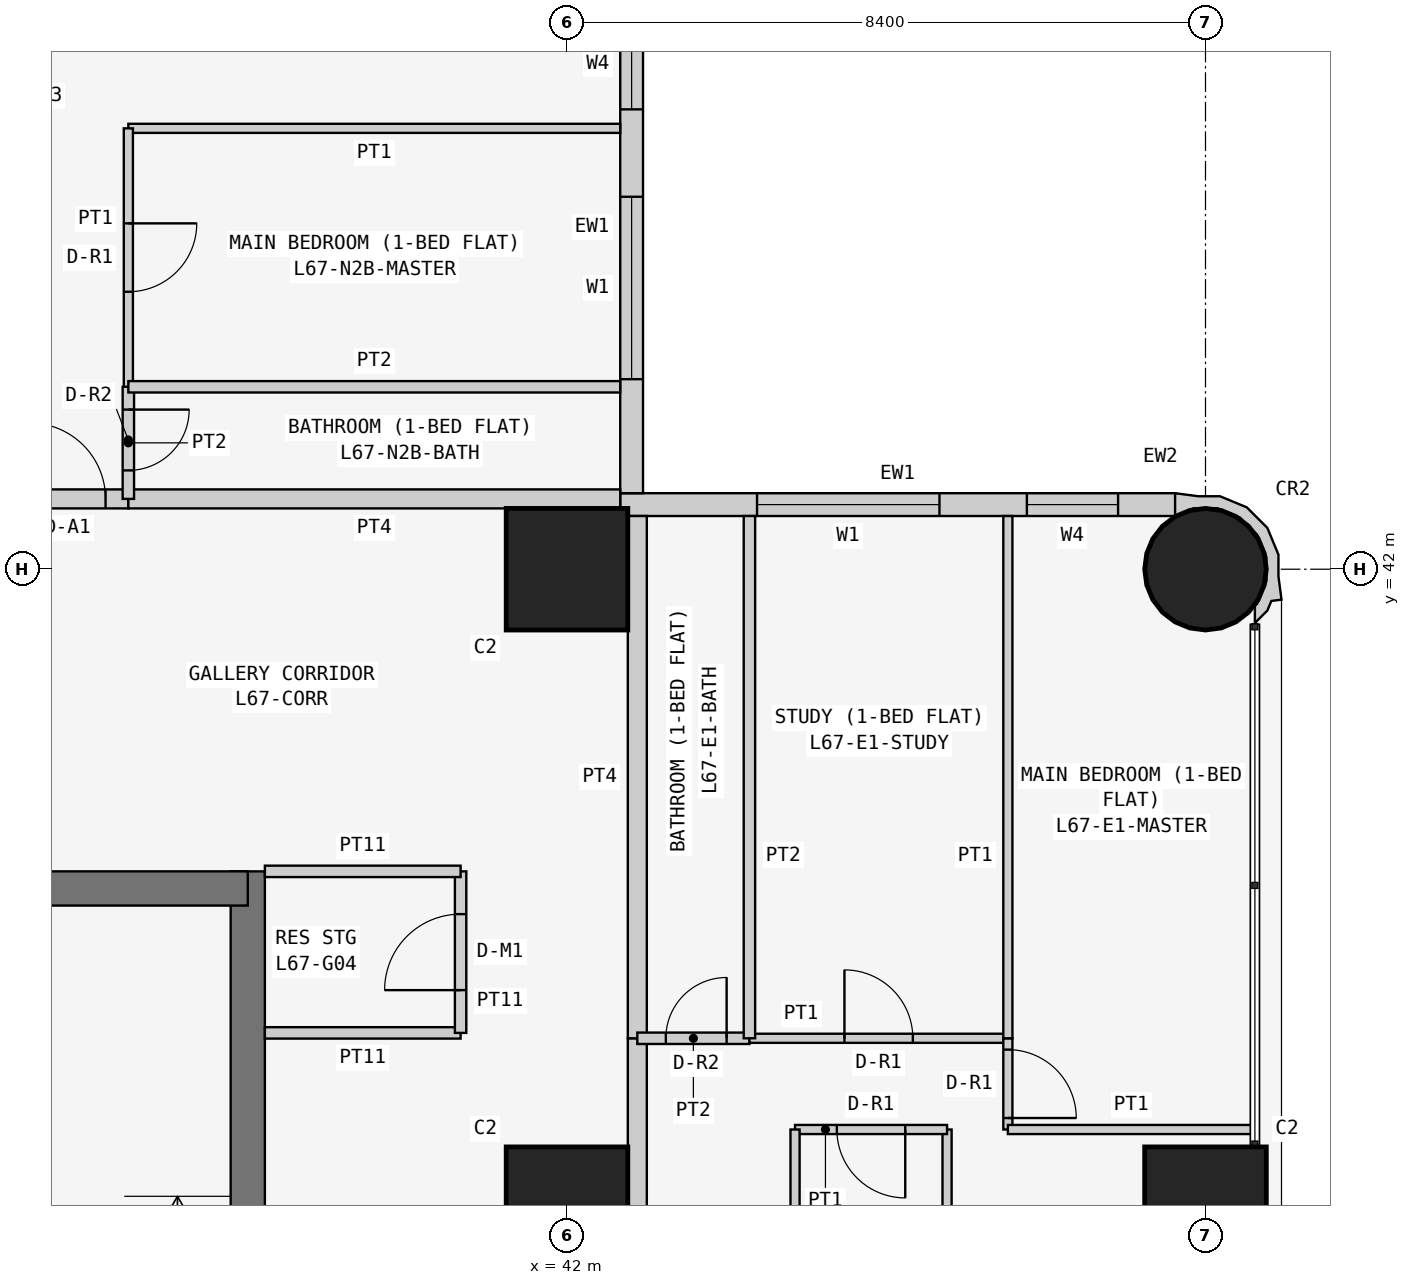
"""IFC4 building model, lengths in metres.
Left out: names, types, materials, properties, quantities, classifications, styles, units other than length and angle.
Written with IfcOpenShell. Run it as: python <this file> out.ifc"""

import sys

from ifc_helpers import new_model, si_unit, direction, frame, frame_2d, origin, origin_2d, place, context, subcontext, project, spatial, polyline, rectangle, circle, outline, extrude, element, fill, save


model = new_model("IFC4")
c1 = context("Model", 3, precision=1e-05, world=origin(), true_north=direction((0.0, 1.0)))
c2 = subcontext(c1, "Body", "Model", "MODEL_VIEW")
j1 = project(units=[si_unit("LENGTHUNIT", "METRE"), si_unit("PLANEANGLEUNIT", "RADIAN")], contexts=[c1])
p1 = place(None, origin())
s1 = spatial("IfcSite", under=j1, at=p1, CompositionType="ELEMENT")
p2 = place(p1, origin())
s2 = spatial("IfcBuilding", under=s1, at=p2, CompositionType="ELEMENT")
p3 = place(p2, frame((0.0, 0.0, 257.7)))
s3 = spatial("IfcBuildingStorey", under=s2, at=p3, CompositionType="ELEMENT", Elevation=257.7)
for number, where, z_axis, x_axis in (
    (1, (42.0, 33.6, 0.0), (0.0, 0.0, 1.0), (1.0, 0.0, 0.0)),
    (2, (42.0, 42.0, 0.0), (0.0, 0.0, 1.0), (1.0, 0.0, 0.0)),
    (3, (50.4, 33.6, 0.0), (0.0, 0.0, 1.0), (1.0, 0.0, 0.0)),
):
    element("IfcColumn", number, at=place(p3, frame(where, z_axis=z_axis, x_axis=x_axis)), inside=s3, PredefinedType="COLUMN", context=c2, shape_type="SweptSolid", body=[
        extrude(rectangle(XDim=1.6, YDim=1.6, at=origin_2d()), origin(), (0.0, 0.0, 1.0), 3.6),
    ])
p4 = place(p3, frame((50.4, 42.0, 0.0), z_axis=(0.0, 0.0, 1.0), x_axis=(1.0, 0.0, 0.0)))
e4 = element("IfcColumn", 4, at=p4, inside=s3, PredefinedType="COLUMN", context=c2, shape_type="SweptSolid", body=[
    extrude(circle(Radius=0.8, at=origin_2d()), origin(), (0.0, 0.0, 1.0), 3.6),
])
p5 = place(p3, frame((37.8, 21.0, 0.0), z_axis=(0.0, 0.0, 1.0), x_axis=(0.0, 1.0, 0.0)))
e5 = element("IfcWall", 5, at=p5, inside=s3, PredefinedType="SHEAR", context=c2, shape_type="SweptSolid", body=[
    extrude(rectangle(XDim=17.025, YDim=0.45, at=frame_2d((8.512, 0.0))), origin(), (0.0, 0.0, 1.0), 3.6),
])
p6 = place(p5, frame((5.2, 0.0, 0.0)))
e6 = element("IfcOpeningElement", 6, at=p6, cuts=e5, PredefinedType="OPENING", context=c2, shape_type="SweptSolid", body=[
    extrude(rectangle(XDim=1.2, YDim=2.1, at=frame_2d((0.6, 1.05))), frame((0.0, 0.235, 0.0), z_axis=(0.0, -1.0, 0.0), x_axis=(1.0, 0.0, 0.0)), (0.0, 0.0, 1.0), 0.47),
])
p7 = place(p3, frame((37.8, 37.8, 0.0), z_axis=(0.0, 0.0, 1.0), x_axis=(-1.0, 0.0, 0.0)))
e7 = element("IfcWall", 7, at=p7, inside=s3, PredefinedType="SHEAR", context=c2, shape_type="SweptSolid", body=[
    extrude(rectangle(XDim=17.025, YDim=0.45, at=frame_2d((8.513, 0.0))), origin(), (0.0, 0.0, 1.0), 3.6),
])
p8 = place(p3, frame((50.0, 42.85, 0.0), z_axis=(0.0, 0.0, 1.0), x_axis=(-1.0, 0.0, 0.0)))
e8 = element("IfcWall", 8, at=p8, inside=s3, PredefinedType="SOLIDWALL", context=c2, shape_type="SweptSolid", body=[
    extrude(rectangle(XDim=7.3, YDim=0.3, at=frame_2d((3.65, 0.0))), origin(), (0.0, 0.0, 1.0), 3.45),
])
p9 = place(p8, frame((3.1, 0.0, 0.9)))
e9 = element("IfcOpeningElement", 9, at=p9, cuts=e8, PredefinedType="OPENING", context=c2, shape_type="SweptSolid", body=[
    extrude(rectangle(XDim=2.4, YDim=1.5, at=frame_2d((1.2, 0.75))), frame((0.0, 0.16, 0.0), z_axis=(0.0, -1.0, 0.0), x_axis=(1.0, 0.0, 0.0)), (0.0, 0.0, 1.0), 0.32),
])
p10 = place(p8, frame((0.75, 0.0, 0.9)))
e10 = element("IfcOpeningElement", 10, at=p10, cuts=e8, PredefinedType="OPENING", context=c2, shape_type="SweptSolid", body=[
    extrude(rectangle(XDim=1.2, YDim=1.5, at=frame_2d((0.6, 0.75))), frame((0.0, 0.16, 0.0), z_axis=(0.0, -1.0, 0.0), x_axis=(1.0, 0.0, 0.0)), (0.0, 0.0, 1.0), 0.32),
])
p11 = place(p3, frame((42.85, 43.0, 0.0), z_axis=(0.0, 0.0, 1.0), x_axis=(0.0, 1.0, 0.0)))
e11 = element("IfcWall", 11, at=p11, inside=s3, PredefinedType="SOLIDWALL", context=c2, shape_type="SweptSolid", body=[
    extrude(rectangle(XDim=7.0, YDim=0.3, at=frame_2d((3.5, 0.0))), origin(), (0.0, 0.0, 1.0), 3.45),
])
p12 = place(p11, frame((1.5, 0.0, 0.9)))
e12 = element("IfcOpeningElement", 12, at=p12, cuts=e11, PredefinedType="OPENING", context=c2, shape_type="SweptSolid", body=[
    extrude(rectangle(XDim=2.4, YDim=1.5, at=frame_2d((1.2, 0.75))), frame((0.0, 0.16, 0.0), z_axis=(0.0, -1.0, 0.0), x_axis=(1.0, 0.0, 0.0)), (0.0, 0.0, 1.0), 0.32),
])
p13 = place(p11, frame((5.05, 0.0, 0.9)))
e13 = element("IfcOpeningElement", 13, at=p13, cuts=e11, PredefinedType="OPENING", context=c2, shape_type="SweptSolid", body=[
    extrude(rectangle(XDim=1.2, YDim=1.5, at=frame_2d((0.6, 0.75))), frame((0.0, 0.16, 0.0), z_axis=(0.0, -1.0, 0.0), x_axis=(1.0, 0.0, 0.0)), (0.0, 0.0, 1.0), 0.32),
])
p14 = place(p3, frame((50.995, 41.352, 0.0), z_axis=(0.0, 0.0, 1.0), x_axis=(0.93923434088, 0.343276641956, 0.0)))
e14 = element("IfcWall", 14, at=p14, inside=s3, PredefinedType="SOLIDWALL", context=c2, shape_type="SweptSolid", body=[
    extrude(outline(polyline([(0.532, 0.393), (0.631, 0.663), (0.614, 1.044), (0.453, 1.391), (0.172, 1.649), (-0.098, 1.748), (-0.369, 1.89), (-0.509, 1.621), (-0.491, 1.615), (-0.479, 1.609), (-0.211, 1.62), (0.088, 1.511), (0.323, 1.295), (0.457, 1.006), (0.47, 0.688), (0.361, 0.389), (0.145, 0.154), (0.108, 0.136), (0.031, -0.075), (0.241, 0.023), (0.333, 0.124), (0.465, 0.094), (0.532, 0.393)])), origin(), (0.0, 0.0, 1.0), 3.45),
])
p15 = place(p3, frame((38.025, 35.9, 0.0), z_axis=(0.0, 0.0, 1.0), x_axis=(1.0, 0.0, 0.0)))
e15 = element("IfcWall", 15, at=p15, inside=s3, PredefinedType="PARTITIONING", context=c2, shape_type="SweptSolid", body=[
    extrude(rectangle(XDim=2.575, YDim=0.15, at=frame_2d((1.288, 0.0))), origin(), (0.0, 0.0, 1.0), 3.45),
])
p16 = place(p3, frame((40.6, 35.9, 0.0), z_axis=(0.0, 0.0, 1.0), x_axis=(0.0, 1.0, 0.0)))
e16 = element("IfcWall", 16, at=p16, inside=s3, PredefinedType="PARTITIONING", context=c2, shape_type="SweptSolid", body=[
    extrude(rectangle(XDim=2.125, YDim=0.15, at=frame_2d((1.062, 0.0))), origin(), (0.0, 0.0, 1.0), 3.45),
])
p17 = place(p16, frame((0.562, 0.0, 0.0)))
e17 = element("IfcOpeningElement", 17, at=p17, cuts=e16, PredefinedType="OPENING", context=c2, shape_type="SweptSolid", body=[
    extrude(rectangle(XDim=1.0, YDim=2.1, at=frame_2d((0.5, 1.05))), frame((0.0, 0.085, 0.0), z_axis=(0.0, -1.0, 0.0), x_axis=(1.0, 0.0, 0.0)), (0.0, 0.0, 1.0), 0.17),
])
p18 = place(p3, frame((40.6, 38.025, 0.0), z_axis=(0.0, 0.0, 1.0), x_axis=(-1.0, 0.0, 0.0)))
e18 = element("IfcWall", 18, at=p18, inside=s3, PredefinedType="PARTITIONING", context=c2, shape_type="SweptSolid", body=[
    extrude(rectangle(XDim=2.575, YDim=0.15, at=frame_2d((1.288, 0.0))), origin(), (0.0, 0.0, 1.0), 3.45),
])
p19 = place(p3, frame((34.629, 42.925, 0.0), z_axis=(0.0, 0.0, 1.0), x_axis=(1.0, 0.0, 0.0)))
e19 = element("IfcWall", 19, at=p19, inside=s3, PredefinedType="PARTITIONING", context=c2, shape_type="SweptSolid", body=[
    extrude(rectangle(XDim=1.6, YDim=0.25, at=frame_2d((0.8, 0.0))), origin(), (0.0, 0.0, 1.0), 3.45),
])
p20 = place(p19, frame((0.3, 0.0, 0.0)))
e20 = element("IfcOpeningElement", 20, at=p20, cuts=e19, PredefinedType="OPENING", context=c2, shape_type="SweptSolid", body=[
    extrude(rectangle(XDim=1.0, YDim=2.1, at=frame_2d((0.5, 1.05))), frame((0.0, 0.135, 0.0), z_axis=(0.0, -1.0, 0.0), x_axis=(1.0, 0.0, 0.0)), (0.0, 0.0, 1.0), 0.27),
])
p21 = place(p3, frame((36.229, 42.925, 0.0), z_axis=(0.0, 0.0, 1.0), x_axis=(1.0, 0.0, 0.0)))
e21 = element("IfcWall", 21, at=p21, inside=s3, PredefinedType="PARTITIONING", context=c2, shape_type="SweptSolid", body=[
    extrude(rectangle(XDim=6.471, YDim=0.25, at=frame_2d((3.235, 0.0))), origin(), (0.0, 0.0, 1.0), 3.45),
])
p22 = place(p3, frame((42.925, 35.829, 0.0), z_axis=(0.0, 0.0, 1.0), x_axis=(0.0, -1.0, 0.0)))
e22 = element("IfcWall", 22, at=p22, inside=s3, PredefinedType="PARTITIONING", context=c2, shape_type="SweptSolid", body=[
    extrude(rectangle(XDim=6.429, YDim=0.25, at=frame_2d((3.215, 0.0))), origin(), (0.0, 0.0, 1.0), 3.45),
])
p23 = place(p22, frame((4.929, 0.0, 0.0)))
e23 = element("IfcOpeningElement", 23, at=p23, cuts=e22, PredefinedType="OPENING", context=c2, shape_type="SweptSolid", body=[
    extrude(rectangle(XDim=1.0, YDim=2.1, at=frame_2d((0.5, 1.05))), frame((0.0, 0.135, 0.0), z_axis=(0.0, -1.0, 0.0), x_axis=(1.0, 0.0, 0.0)), (0.0, 0.0, 1.0), 0.27),
])
p24 = place(p3, frame((42.925, 42.7, 0.0), z_axis=(0.0, 0.0, 1.0), x_axis=(0.0, -1.0, 0.0)))
e24 = element("IfcWall", 24, at=p24, inside=s3, PredefinedType="PARTITIONING", context=c2, shape_type="SweptSolid", body=[
    extrude(rectangle(XDim=6.871, YDim=0.25, at=frame_2d((3.436, 0.0))), origin(), (0.0, 0.0, 1.0), 3.45),
])
p25 = place(p3, frame((36.229, 44.4, 0.0), z_axis=(0.0, 0.0, 1.0), x_axis=(0.0, -1.0, 0.0)))
e25 = element("IfcWall", 25, at=p25, inside=s3, PredefinedType="PARTITIONING", context=c2, shape_type="SweptSolid", body=[
    extrude(rectangle(XDim=1.475, YDim=0.15, at=frame_2d((0.737, 0.0))), origin(), (0.0, 0.0, 1.0), 3.45),
])
p26 = place(p25, frame((0.3, 0.0, 0.0)))
e26 = element("IfcOpeningElement", 26, at=p26, cuts=e25, PredefinedType="OPENING", context=c2, shape_type="SweptSolid", body=[
    extrude(rectangle(XDim=0.8, YDim=2.1, at=frame_2d((0.4, 1.05))), frame((0.0, 0.085, 0.0), z_axis=(0.0, -1.0, 0.0), x_axis=(1.0, 0.0, 0.0)), (0.0, 0.0, 1.0), 0.17),
])
p27 = place(p3, frame((42.7, 47.8, 0.0), z_axis=(0.0, 0.0, 1.0), x_axis=(-1.0, 0.0, 0.0)))
e27 = element("IfcWall", 27, at=p27, inside=s3, PredefinedType="PARTITIONING", context=c2, shape_type="SweptSolid", body=[
    extrude(rectangle(XDim=6.471, YDim=0.12, at=frame_2d((3.235, 0.0))), origin(), (0.0, 0.0, 1.0), 3.45),
])
p28 = place(p3, frame((36.229, 47.8, 0.0), z_axis=(0.0, 0.0, 1.0), x_axis=(0.0, -1.0, 0.0)))
e28 = element("IfcWall", 28, at=p28, inside=s3, PredefinedType="PARTITIONING", context=c2, shape_type="SweptSolid", body=[
    extrude(rectangle(XDim=3.4, YDim=0.12, at=frame_2d((1.7, 0.0))), origin(), (0.0, 0.0, 1.0), 3.45),
])
p29 = place(p28, frame((1.25, 0.0, 0.0)))
e29 = element("IfcOpeningElement", 29, at=p29, cuts=e28, PredefinedType="OPENING", context=c2, shape_type="SweptSolid", body=[
    extrude(rectangle(XDim=0.9, YDim=2.1, at=frame_2d((0.45, 1.05))), frame((0.0, 0.07, 0.0), z_axis=(0.0, -1.0, 0.0), x_axis=(1.0, 0.0, 0.0)), (0.0, 0.0, 1.0), 0.14),
])
p30 = place(p3, frame((36.229, 44.4, 0.0), z_axis=(0.0, 0.0, 1.0), x_axis=(1.0, 0.0, 0.0)))
e30 = element("IfcWall", 30, at=p30, inside=s3, PredefinedType="PARTITIONING", context=c2, shape_type="SweptSolid", body=[
    extrude(rectangle(XDim=6.471, YDim=0.15, at=frame_2d((3.235, 0.0))), origin(), (0.0, 0.0, 1.0), 3.45),
])
p31 = place(p3, frame((47.0, 29.4, 0.0), z_axis=(0.0, 0.0, 1.0), x_axis=(0.0, 1.0, 0.0)))
e31 = element("IfcWall", 31, at=p31, inside=s3, PredefinedType="PARTITIONING", context=c2, shape_type="SweptSolid", body=[
    extrude(rectangle(XDim=5.229, YDim=0.12, at=frame_2d((2.615, 0.0))), origin(), (0.0, 0.0, 1.0), 3.45),
])
p32 = place(p3, frame((47.0, 34.629, 0.0), z_axis=(0.0, 0.0, 1.0), x_axis=(-1.0, 0.0, 0.0)))
e32 = element("IfcWall", 32, at=p32, inside=s3, PredefinedType="PARTITIONING", context=c2, shape_type="SweptSolid", body=[
    extrude(rectangle(XDim=2.0, YDim=0.12, at=frame_2d((1.0, 0.0))), origin(), (0.0, 0.0, 1.0), 3.45),
])
p33 = place(p32, frame((0.55, 0.0, 0.0)))
e33 = element("IfcOpeningElement", 33, at=p33, cuts=e32, PredefinedType="OPENING", context=c2, shape_type="SweptSolid", body=[
    extrude(rectangle(XDim=0.9, YDim=2.1, at=frame_2d((0.45, 1.05))), frame((0.0, 0.07, 0.0), z_axis=(0.0, -1.0, 0.0), x_axis=(1.0, 0.0, 0.0)), (0.0, 0.0, 1.0), 0.14),
])
p34 = place(p3, frame((45.0, 34.629, 0.0), z_axis=(0.0, 0.0, 1.0), x_axis=(0.0, -1.0, 0.0)))
e34 = element("IfcWall", 34, at=p34, inside=s3, PredefinedType="PARTITIONING", context=c2, shape_type="SweptSolid", body=[
    extrude(rectangle(XDim=5.229, YDim=0.12, at=frame_2d((2.615, 0.0))), origin(), (0.0, 0.0, 1.0), 3.45),
])
p35 = place(p3, frame((42.925, 35.829, 0.0), z_axis=(0.0, 0.0, 1.0), x_axis=(1.0, 0.0, 0.0)))
e35 = element("IfcWall", 35, at=p35, inside=s3, PredefinedType="PARTITIONING", context=c2, shape_type="SweptSolid", body=[
    extrude(rectangle(XDim=1.475, YDim=0.15, at=frame_2d((0.737, 0.0))), origin(), (0.0, 0.0, 1.0), 3.45),
])
p36 = place(p35, frame((0.375, 0.0, 0.0)))
e36 = element("IfcOpeningElement", 36, at=p36, cuts=e35, PredefinedType="OPENING", context=c2, shape_type="SweptSolid", body=[
    extrude(rectangle(XDim=0.8, YDim=2.1, at=frame_2d((0.4, 1.05))), frame((0.0, 0.085, 0.0), z_axis=(0.0, -1.0, 0.0), x_axis=(1.0, 0.0, 0.0)), (0.0, 0.0, 1.0), 0.17),
])
p37 = place(p3, frame((44.4, 35.829, 0.0), z_axis=(0.0, 0.0, 1.0), x_axis=(1.0, 0.0, 0.0)))
e37 = element("IfcWall", 37, at=p37, inside=s3, PredefinedType="PARTITIONING", context=c2, shape_type="SweptSolid", body=[
    extrude(rectangle(XDim=3.4, YDim=0.12, at=frame_2d((1.7, 0.0))), origin(), (0.0, 0.0, 1.0), 3.45),
])
p38 = place(p37, frame((1.25, 0.0, 0.0)))
e38 = element("IfcOpeningElement", 38, at=p38, cuts=e37, PredefinedType="OPENING", context=c2, shape_type="SweptSolid", body=[
    extrude(rectangle(XDim=0.9, YDim=2.1, at=frame_2d((0.45, 1.05))), frame((0.0, 0.07, 0.0), z_axis=(0.0, -1.0, 0.0), x_axis=(1.0, 0.0, 0.0)), (0.0, 0.0, 1.0), 0.14),
])
p39 = place(p3, frame((47.8, 35.829, 0.0), z_axis=(0.0, 0.0, 1.0), x_axis=(0.0, -1.0, 0.0)))
e39 = element("IfcWall", 39, at=p39, inside=s3, PredefinedType="PARTITIONING", context=c2, shape_type="SweptSolid", body=[
    extrude(rectangle(XDim=1.2, YDim=0.12, at=frame_2d((0.6, 0.0))), origin(), (0.0, 0.0, 1.0), 3.45),
])
p40 = place(p39, frame((0.149, 0.0, 0.0)))
e40 = element("IfcOpeningElement", 40, at=p40, cuts=e39, PredefinedType="OPENING", context=c2, shape_type="SweptSolid", body=[
    extrude(rectangle(XDim=0.9, YDim=2.1, at=frame_2d((0.45, 1.05))), frame((0.0, 0.07, 0.0), z_axis=(0.0, -1.0, 0.0), x_axis=(1.0, 0.0, 0.0)), (0.0, 0.0, 1.0), 0.14),
])
p41 = place(p3, frame((47.8, 34.629, 0.0), z_axis=(0.0, 0.0, 1.0), x_axis=(1.0, 0.0, 0.0)))
e41 = element("IfcWall", 41, at=p41, inside=s3, PredefinedType="PARTITIONING", context=c2, shape_type="SweptSolid", body=[
    extrude(rectangle(XDim=3.25, YDim=0.12, at=frame_2d((1.625, 0.0))), origin(), (0.0, 0.0, 1.0), 3.45),
])
p42 = place(p3, frame((44.4, 35.829, 0.0), z_axis=(0.0, 0.0, 1.0), x_axis=(0.0, 1.0, 0.0)))
e42 = element("IfcWall", 42, at=p42, inside=s3, PredefinedType="PARTITIONING", context=c2, shape_type="SweptSolid", body=[
    extrude(rectangle(XDim=6.871, YDim=0.15, at=frame_2d((3.436, 0.0))), origin(), (0.0, 0.0, 1.0), 3.45),
])
p43 = place(p3, frame((47.8, 35.829, 0.0), z_axis=(0.0, 0.0, 1.0), x_axis=(0.0, 1.0, 0.0)))
e43 = element("IfcWall", 43, at=p43, inside=s3, PredefinedType="PARTITIONING", context=c2, shape_type="SweptSolid", body=[
    extrude(rectangle(XDim=6.871, YDim=0.12, at=frame_2d((3.436, 0.0))), origin(), (0.0, 0.0, 1.0), 3.45),
])
p44 = place(p12, origin())
e44 = element("IfcWindow", 44, at=p44, inside=s3, PartitioningType="SINGLE_PANEL", PredefinedType="WINDOW", context=c2, shape_type="SweptSolid", body=[
    extrude(rectangle(XDim=2.4, YDim=1.5, at=frame_2d((1.2, 0.75))), frame((0.0, 0.03, 0.0), z_axis=(0.0, -1.0, 0.0), x_axis=(1.0, 0.0, 0.0)), (0.0, 0.0, 1.0), 0.06),
])
fill(e12, e44)
p45 = place(p13, origin())
e45 = element("IfcWindow", 45, at=p45, inside=s3, PartitioningType="SINGLE_PANEL", PredefinedType="WINDOW", context=c2, shape_type="SweptSolid", body=[
    extrude(rectangle(XDim=1.2, YDim=1.5, at=frame_2d((0.6, 0.75))), frame((0.0, 0.03, 0.0), z_axis=(0.0, -1.0, 0.0), x_axis=(1.0, 0.0, 0.0)), (0.0, 0.0, 1.0), 0.06),
])
fill(e13, e45)
p46 = place(p9, origin())
e46 = element("IfcWindow", 46, at=p46, inside=s3, PartitioningType="SINGLE_PANEL", PredefinedType="WINDOW", context=c2, shape_type="SweptSolid", body=[
    extrude(rectangle(XDim=2.4, YDim=1.5, at=frame_2d((1.2, 0.75))), frame((0.0, 0.03, 0.0), z_axis=(0.0, -1.0, 0.0), x_axis=(1.0, 0.0, 0.0)), (0.0, 0.0, 1.0), 0.06),
])
fill(e9, e46)
p47 = place(p10, origin())
e47 = element("IfcWindow", 47, at=p47, inside=s3, PartitioningType="SINGLE_PANEL", PredefinedType="WINDOW", context=c2, shape_type="SweptSolid", body=[
    extrude(rectangle(XDim=1.2, YDim=1.5, at=frame_2d((0.6, 0.75))), frame((0.0, 0.03, 0.0), z_axis=(0.0, -1.0, 0.0), x_axis=(1.0, 0.0, 0.0)), (0.0, 0.0, 1.0), 0.06),
])
fill(e10, e47)
p48 = place(p17, origin())
e48 = element("IfcDoor", 48, at=p48, inside=s3, OperationType="SINGLE_SWING_LEFT", PredefinedType="DOOR", context=c2, shape_type="SweptSolid", body=[
    extrude(rectangle(XDim=1.0, YDim=2.1, at=frame_2d((0.5, 1.05))), frame((0.0, 0.025, 0.0), z_axis=(0.0, -1.0, 0.0), x_axis=(1.0, 0.0, 0.0)), (0.0, 0.0, 1.0), 0.05),
])
fill(e17, e48)
p49 = place(p20, origin())
e49 = element("IfcDoor", 49, at=p49, inside=s3, OperationType="SINGLE_SWING_LEFT", PredefinedType="DOOR", context=c2, shape_type="SweptSolid", body=[
    extrude(rectangle(XDim=1.0, YDim=2.1, at=frame_2d((0.5, 1.05))), frame((0.0, 0.025, 0.0), z_axis=(0.0, -1.0, 0.0), x_axis=(1.0, 0.0, 0.0)), (0.0, 0.0, 1.0), 0.05),
])
fill(e20, e49)
p50 = place(p26, origin())
e50 = element("IfcDoor", 50, at=p50, inside=s3, OperationType="SINGLE_SWING_LEFT", PredefinedType="DOOR", context=c2, shape_type="SweptSolid", body=[
    extrude(rectangle(XDim=0.8, YDim=2.1, at=frame_2d((0.4, 1.05))), frame((0.0, 0.025, 0.0), z_axis=(0.0, -1.0, 0.0), x_axis=(1.0, 0.0, 0.0)), (0.0, 0.0, 1.0), 0.05),
])
fill(e26, e50)
p51 = place(p29, origin())
e51 = element("IfcDoor", 51, at=p51, inside=s3, OperationType="SINGLE_SWING_LEFT", PredefinedType="DOOR", context=c2, shape_type="SweptSolid", body=[
    extrude(rectangle(XDim=0.9, YDim=2.1, at=frame_2d((0.45, 1.05))), frame((0.0, 0.025, 0.0), z_axis=(0.0, -1.0, 0.0), x_axis=(1.0, 0.0, 0.0)), (0.0, 0.0, 1.0), 0.05),
])
fill(e29, e51)
p52 = place(p33, origin())
e52 = element("IfcDoor", 52, at=p52, inside=s3, OperationType="SINGLE_SWING_LEFT", PredefinedType="DOOR", context=c2, shape_type="SweptSolid", body=[
    extrude(rectangle(XDim=0.9, YDim=2.1, at=frame_2d((0.45, 1.05))), frame((0.0, 0.025, 0.0), z_axis=(0.0, -1.0, 0.0), x_axis=(1.0, 0.0, 0.0)), (0.0, 0.0, 1.0), 0.05),
])
fill(e33, e52)
p53 = place(p36, origin())
e53 = element("IfcDoor", 53, at=p53, inside=s3, OperationType="SINGLE_SWING_RIGHT", PredefinedType="DOOR", context=c2, shape_type="SweptSolid", body=[
    extrude(rectangle(XDim=0.8, YDim=2.1, at=frame_2d((0.4, 1.05))), frame((0.0, 0.025, 0.0), z_axis=(0.0, -1.0, 0.0), x_axis=(1.0, 0.0, 0.0)), (0.0, 0.0, 1.0), 0.05),
])
fill(e36, e53)
p54 = place(p38, origin())
e54 = element("IfcDoor", 54, at=p54, inside=s3, OperationType="SINGLE_SWING_LEFT", PredefinedType="DOOR", context=c2, shape_type="SweptSolid", body=[
    extrude(rectangle(XDim=0.9, YDim=2.1, at=frame_2d((0.45, 1.05))), frame((0.0, 0.025, 0.0), z_axis=(0.0, -1.0, 0.0), x_axis=(1.0, 0.0, 0.0)), (0.0, 0.0, 1.0), 0.05),
])
fill(e38, e54)
p55 = place(p40, origin())
e55 = element("IfcDoor", 55, at=p55, inside=s3, OperationType="SINGLE_SWING_RIGHT", PredefinedType="DOOR", context=c2, shape_type="SweptSolid", body=[
    extrude(rectangle(XDim=0.9, YDim=2.1, at=frame_2d((0.45, 1.05))), frame((0.0, 0.025, 0.0), z_axis=(0.0, -1.0, 0.0), x_axis=(1.0, 0.0, 0.0)), (0.0, 0.0, 1.0), 0.05),
])
fill(e40, e55)
save(model, sys.argv[1])
